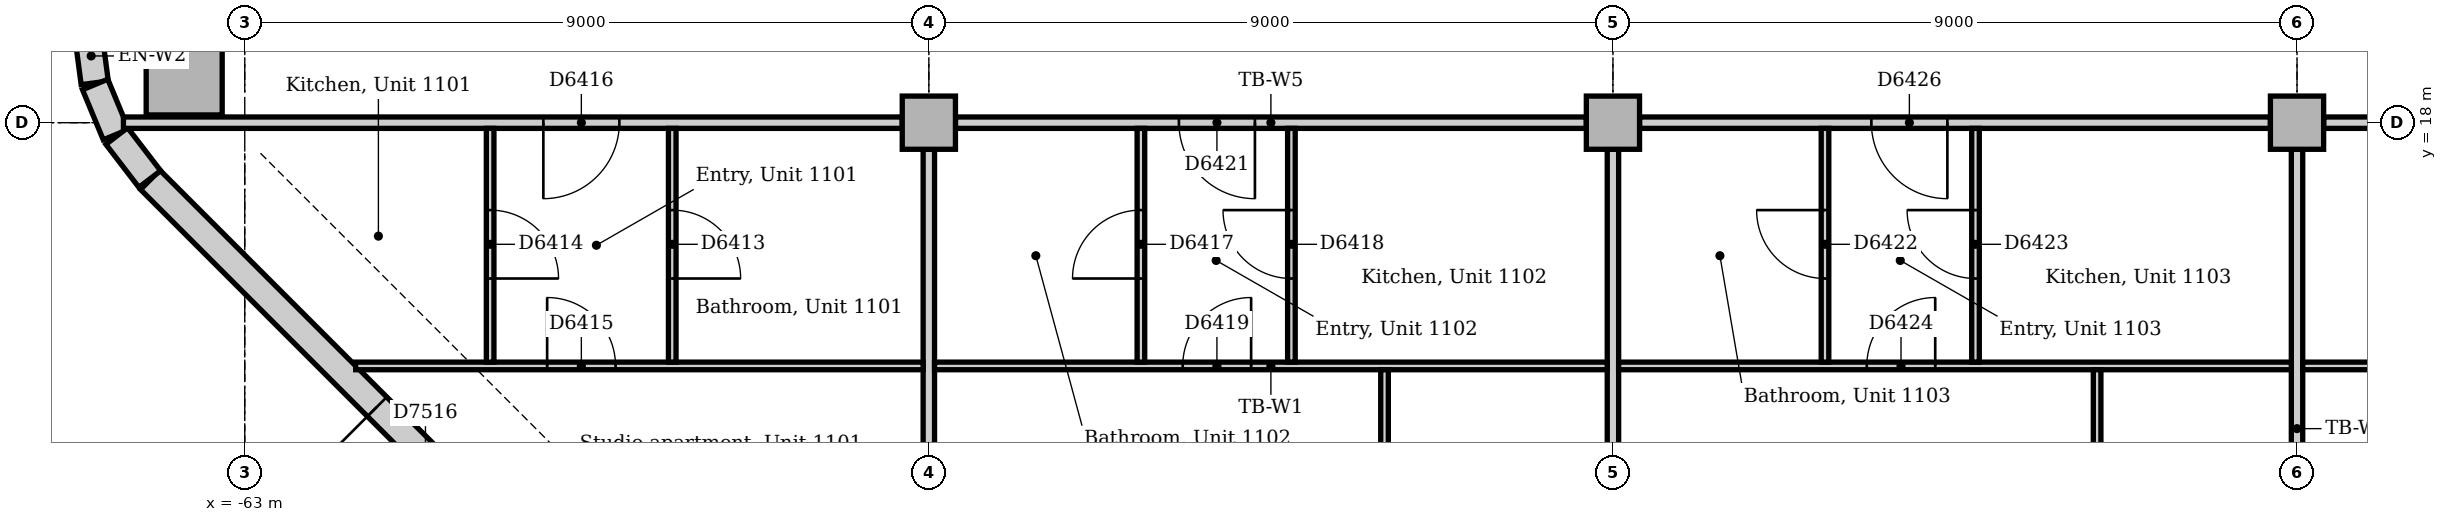
"""IFC4 building model, lengths in metres.
Left out: names, types, materials, properties, quantities, classifications, styles, units other than length and angle.
Written with IfcOpenShell. Run it as: python <this file> out.ifc"""

import sys

from ifc_helpers import new_model, si_unit, direction, frame, frame_2d, origin, origin_2d, place, context, subcontext, project, spatial, rectangle, extrude, element, fill, save


model = new_model("IFC4")
c1 = context("Model", 3, precision=1e-05, world=origin(), true_north=direction((0.0, 1.0)))
c2 = subcontext(c1, "Body", "Model", "MODEL_VIEW")
j1 = project(units=[si_unit("LENGTHUNIT", "METRE"), si_unit("PLANEANGLEUNIT", "RADIAN")], contexts=[c1])
p1 = place(None, origin())
s1 = spatial("IfcSite", under=j1, at=p1, CompositionType="ELEMENT")
p2 = place(p1, origin())
s2 = spatial("IfcBuilding", under=s1, at=p2, CompositionType="ELEMENT")
p3 = place(p2, frame((0.0, 0.0, 51.0)))
s3 = spatial("IfcBuildingStorey", under=s2, at=p3, CompositionType="ELEMENT", Elevation=51.0)
p4 = place(p3, frame((-63.797, 18.602, -0.15), z_axis=(0.0, 0.0, 1.0), x_axis=(1.0, 0.0, 0.0)))
e1 = element("IfcColumn", 1, at=p4, inside=s3, PredefinedType="COLUMN", context=c2, shape_type="SweptSolid", body=[
    extrude(rectangle(XDim=1.0, YDim=1.0, at=origin_2d()), origin(), (0.0, 0.0, 1.0), 4.0),
])
for number, where, z_axis, x_axis in (
    (2, (-54.0, 18.0, 0.0), (0.0, 0.0, 1.0), (1.0, 0.0, 0.0)),
    (3, (-45.0, 18.0, 0.0), (0.0, 0.0, 1.0), (1.0, 0.0, 0.0)),
    (4, (-36.0, 18.0, 0.0), (0.0, 0.0, 1.0), (1.0, 0.0, 0.0)),
):
    element("IfcColumn", number, at=place(p3, frame(where, z_axis=z_axis, x_axis=x_axis)), inside=s3, PredefinedType="COLUMN", context=c2, shape_type="SweptSolid", body=[
        extrude(rectangle(XDim=0.7, YDim=0.7, at=origin_2d()), origin(), (0.0, 0.0, 1.0), 3.85),
    ])
p5 = place(p3, frame((-64.244, 17.249, 0.0), z_axis=(0.0, 0.0, 1.0), x_axis=(0.707106781187, -0.707106781187, 0.0)))
e5 = element("IfcWall", 5, at=p5, inside=s3, PredefinedType="STANDARD", context=c2, shape_type="SweptSolid", body=[
    extrude(rectangle(XDim=10.243, YDim=0.36, at=frame_2d((5.121, 0.0))), origin(), (0.0, 0.0, 1.0), 3.85),
])
p6 = place(p5, frame((4.221, 0.0, 0.0)))
e6 = element("IfcOpeningElement", 6, at=p6, cuts=e5, PredefinedType="OPENING", context=c2, shape_type="SweptSolid", body=[
    extrude(rectangle(XDim=1.8, YDim=2.4, at=frame_2d((0.9, 1.2))), frame((0.0, 0.19, 0.0), z_axis=(0.0, -1.0, 0.0), x_axis=(1.0, 0.0, 0.0)), (0.0, 0.0, 1.0), 0.38),
])
for number, where, z_axis, x_axis in (
    (7, (-65.067, 19.231, 0.0), (0.0, 0.0, 1.0), (0.131, -0.991, 0.0)),
    (8, (-64.968, 18.503, 0.0), (0.0, 0.0, 1.0), (0.383, -0.924, 0.0)),
):
    element("IfcWall", number, at=place(p3, frame(where, z_axis=z_axis, x_axis=x_axis)), inside=s3, PredefinedType="STANDARD", context=c2, shape_type="SweptSolid", body=[
        extrude(rectangle(XDim=0.713, YDim=0.36, at=frame_2d((0.356, 0.0))), origin(), (0.0, 0.0, 1.0), 3.85),
    ])
p7 = place(p3, frame((-64.684, 17.825, 0.0), z_axis=(0.0, 0.0, 1.0), x_axis=(0.608802368033, -0.793321924995, 0.0)))
e9 = element("IfcWall", 9, at=p7, inside=s3, PredefinedType="STANDARD", context=c2, shape_type="SweptSolid", body=[
    extrude(rectangle(XDim=0.713, YDim=0.36, at=frame_2d((0.357, 0.0))), origin(), (0.0, 0.0, 1.0), 3.85),
])
p8 = place(p3, frame((-35.65, 18.0, 0.0), z_axis=(0.0, 0.0, 1.0), x_axis=(1.0, 0.0, 0.0)))
e10 = element("IfcWall", 10, at=p8, inside=s3, PredefinedType="PARTITIONING", context=c2, shape_type="SweptSolid", body=[
    extrude(rectangle(XDim=7.35, YDim=0.15, at=frame_2d((3.675, 0.0))), origin(), (0.0, 0.0, 1.0), 3.158),
])
p9 = place(p8, frame((2.778, 0.0, 0.0)))
e11 = element("IfcOpeningElement", 11, at=p9, cuts=e10, PredefinedType="OPENING", context=c2, shape_type="SweptSolid", body=[
    extrude(rectangle(XDim=1.0, YDim=2.1, at=frame_2d((0.5, 1.05))), frame((0.0, 0.085, 0.0), z_axis=(0.0, -1.0, 0.0), x_axis=(1.0, 0.0, 0.0)), (0.0, 0.0, 1.0), 0.17),
])
p10 = place(p3, frame((-44.65, 18.0, 0.0), z_axis=(0.0, 0.0, 1.0), x_axis=(1.0, 0.0, 0.0)))
e12 = element("IfcWall", 12, at=p10, inside=s3, PredefinedType="PARTITIONING", context=c2, shape_type="SweptSolid", body=[
    extrude(rectangle(XDim=8.3, YDim=0.15, at=frame_2d((4.15, 0.0))), origin(), (0.0, 0.0, 1.0), 3.158),
])
p11 = place(p10, frame((3.05, 0.0, 0.0)))
e13 = element("IfcOpeningElement", 13, at=p11, cuts=e12, PredefinedType="OPENING", context=c2, shape_type="SweptSolid", body=[
    extrude(rectangle(XDim=1.0, YDim=2.1, at=frame_2d((0.5, 1.05))), frame((0.0, 0.085, 0.0), z_axis=(0.0, -1.0, 0.0), x_axis=(1.0, 0.0, 0.0)), (0.0, 0.0, 1.0), 0.17),
])
p12 = place(p3, frame((-53.65, 18.0, 0.0), z_axis=(0.0, 0.0, 1.0), x_axis=(1.0, 0.0, 0.0)))
e14 = element("IfcWall", 14, at=p12, inside=s3, PredefinedType="PARTITIONING", context=c2, shape_type="SweptSolid", body=[
    extrude(rectangle(XDim=8.3, YDim=0.15, at=frame_2d((4.15, 0.0))), origin(), (0.0, 0.0, 1.0), 3.158),
])
p13 = place(p12, frame((2.94, 0.0, 0.0)))
e15 = element("IfcOpeningElement", 15, at=p13, cuts=e14, PredefinedType="OPENING", context=c2, shape_type="SweptSolid", body=[
    extrude(rectangle(XDim=1.0, YDim=2.1, at=frame_2d((0.5, 1.05))), frame((0.0, 0.085, 0.0), z_axis=(0.0, -1.0, 0.0), x_axis=(1.0, 0.0, 0.0)), (0.0, 0.0, 1.0), 0.17),
])
p14 = place(p3, frame((-64.596, 18.0, 0.0), z_axis=(0.0, 0.0, 1.0), x_axis=(1.0, 0.0, 0.0)))
e16 = element("IfcWall", 16, at=p14, inside=s3, PredefinedType="PARTITIONING", context=c2, shape_type="SweptSolid", body=[
    extrude(rectangle(XDim=10.246, YDim=0.15, at=frame_2d((5.123, 0.0))), origin(), (0.0, 0.0, 1.0), 3.158),
])
p15 = place(p14, frame((5.524, 0.0, 0.0)))
e17 = element("IfcOpeningElement", 17, at=p15, cuts=e16, PredefinedType="OPENING", context=c2, shape_type="SweptSolid", body=[
    extrude(rectangle(XDim=1.0, YDim=2.1, at=frame_2d((0.5, 1.05))), frame((0.0, 0.085, 0.0), z_axis=(0.0, -1.0, 0.0), x_axis=(1.0, 0.0, 0.0)), (0.0, 0.0, 1.0), 0.17),
])
p16 = place(p3, frame((-54.0, 9.36, 0.0), z_axis=(0.0, 0.0, 1.0), x_axis=(0.0, 1.0, 0.0)))
e18 = element("IfcWall", 18, at=p16, inside=s3, PredefinedType="PARTITIONING", context=c2, shape_type="SweptSolid", body=[
    extrude(rectangle(XDim=8.29, YDim=0.15, at=frame_2d((4.145, 0.0))), origin(), (0.0, 0.0, 1.0), 3.256),
])
for number, where, z_axis, x_axis in (
    (19, (-45.0, 10.3, 0.0), (0.0, 0.0, 1.0), (0.0, 1.0, 0.0)),
    (20, (-36.0, 10.3, 0.0), (0.0, 0.0, 1.0), (0.0, 1.0, 0.0)),
):
    element("IfcWall", number, at=place(p3, frame(where, z_axis=z_axis, x_axis=x_axis)), inside=s3, PredefinedType="PARTITIONING", context=c2, shape_type="SweptSolid", body=[
        extrude(rectangle(XDim=7.35, YDim=0.15, at=frame_2d((3.675, 0.0))), origin(), (0.0, 0.0, 1.0), 3.256),
    ])
p17 = place(p3, frame((-35.925, 14.8, 0.0), z_axis=(0.0, 0.0, 1.0), x_axis=(1.0, 0.0, 0.0)))
e21 = element("IfcWall", 21, at=p17, inside=s3, PredefinedType="PARTITIONING", context=c2, shape_type="SweptSolid", body=[
    extrude(rectangle(XDim=8.565, YDim=0.1, at=frame_2d((4.282, 0.0))), origin(), (0.0, 0.0, 1.0), 3.85),
])
p18 = place(p17, frame((3.103, 0.0, 0.0)))
e22 = element("IfcOpeningElement", 22, at=p18, cuts=e21, PredefinedType="OPENING", context=c2, shape_type="SweptSolid", body=[
    extrude(rectangle(XDim=0.9, YDim=2.1, at=frame_2d((0.45, 1.05))), frame((0.0, 0.06, 0.0), z_axis=(0.0, -1.0, 0.0), x_axis=(1.0, 0.0, 0.0)), (0.0, 0.0, 1.0), 0.12),
])
p19 = place(p3, frame((-44.925, 14.8, 0.0), z_axis=(0.0, 0.0, 1.0), x_axis=(1.0, 0.0, 0.0)))
e23 = element("IfcWall", 23, at=p19, inside=s3, PredefinedType="PARTITIONING", context=c2, shape_type="SweptSolid", body=[
    extrude(rectangle(XDim=8.85, YDim=0.1, at=frame_2d((4.425, 0.0))), origin(), (0.0, 0.0, 1.0), 3.85),
])
p20 = place(p19, frame((3.265, 0.0, 0.0)))
e24 = element("IfcOpeningElement", 24, at=p20, cuts=e23, PredefinedType="OPENING", context=c2, shape_type="SweptSolid", body=[
    extrude(rectangle(XDim=0.9, YDim=2.1, at=frame_2d((0.45, 1.05))), frame((0.0, 0.06, 0.0), z_axis=(0.0, -1.0, 0.0), x_axis=(1.0, 0.0, 0.0)), (0.0, 0.0, 1.0), 0.12),
])
p21 = place(p3, frame((-53.925, 14.8, 0.0), z_axis=(0.0, 0.0, 1.0), x_axis=(1.0, 0.0, 0.0)))
e25 = element("IfcWall", 25, at=p21, inside=s3, PredefinedType="PARTITIONING", context=c2, shape_type="SweptSolid", body=[
    extrude(rectangle(XDim=8.85, YDim=0.1, at=frame_2d((4.425, 0.0))), origin(), (0.0, 0.0, 1.0), 3.85),
])
p22 = place(p21, frame((3.265, 0.0, 0.0)))
e26 = element("IfcOpeningElement", 26, at=p22, cuts=e25, PredefinedType="OPENING", context=c2, shape_type="SweptSolid", body=[
    extrude(rectangle(XDim=0.9, YDim=2.1, at=frame_2d((0.45, 1.05))), frame((0.0, 0.06, 0.0), z_axis=(0.0, -1.0, 0.0), x_axis=(1.0, 0.0, 0.0)), (0.0, 0.0, 1.0), 0.12),
])
p23 = place(p3, frame((-61.541, 14.8, 0.0), z_axis=(0.0, 0.0, 1.0), x_axis=(1.0, 0.0, 0.0)))
e27 = element("IfcWall", 27, at=p23, inside=s3, PredefinedType="PARTITIONING", context=c2, shape_type="SweptSolid", body=[
    extrude(rectangle(XDim=7.466, YDim=0.1, at=frame_2d((3.733, 0.0))), origin(), (0.0, 0.0, 1.0), 3.85),
])
p24 = place(p23, frame((2.519, 0.0, 0.0)))
e28 = element("IfcOpeningElement", 28, at=p24, cuts=e27, PredefinedType="OPENING", context=c2, shape_type="SweptSolid", body=[
    extrude(rectangle(XDim=0.9, YDim=2.1, at=frame_2d((0.45, 1.05))), frame((0.0, 0.06, 0.0), z_axis=(0.0, -1.0, 0.0), x_axis=(1.0, 0.0, 0.0)), (0.0, 0.0, 1.0), 0.12),
])
p25 = place(p3, frame((-48.005, 9.36, 0.0), z_axis=(0.0, 0.0, 1.0), x_axis=(0.0, 1.0, 0.0)))
e29 = element("IfcWall", 29, at=p25, inside=s3, PredefinedType="PARTITIONING", context=c2, shape_type="SweptSolid", body=[
    extrude(rectangle(XDim=5.39, YDim=0.1, at=frame_2d((2.695, 0.0))), origin(), (0.0, 0.0, 1.0), 3.85),
])
p26 = place(p25, frame((2.25, 0.0, 0.0)))
e30 = element("IfcOpeningElement", 30, at=p26, cuts=e29, PredefinedType="OPENING", context=c2, shape_type="SweptSolid", body=[
    extrude(rectangle(XDim=0.9, YDim=2.1, at=frame_2d((0.45, 1.05))), frame((0.0, 0.06, 0.0), z_axis=(0.0, -1.0, 0.0), x_axis=(1.0, 0.0, 0.0)), (0.0, 0.0, 1.0), 0.12),
])
p27 = place(p3, frame((-38.63, 9.36, 0.0), z_axis=(0.0, 0.0, 1.0), x_axis=(0.0, 1.0, 0.0)))
e31 = element("IfcWall", 31, at=p27, inside=s3, PredefinedType="PARTITIONING", context=c2, shape_type="SweptSolid", body=[
    extrude(rectangle(XDim=5.39, YDim=0.1, at=frame_2d((2.695, 0.0))), origin(), (0.0, 0.0, 1.0), 3.85),
])
p28 = place(p27, frame((2.25, 0.0, 0.0)))
e32 = element("IfcOpeningElement", 32, at=p28, cuts=e31, PredefinedType="OPENING", context=c2, shape_type="SweptSolid", body=[
    extrude(rectangle(XDim=0.9, YDim=2.1, at=frame_2d((0.45, 1.05))), frame((0.0, 0.06, 0.0), z_axis=(0.0, -1.0, 0.0), x_axis=(1.0, 0.0, 0.0)), (0.0, 0.0, 1.0), 0.12),
])
p29 = place(p3, frame((-59.772, 14.85, 0.0), z_axis=(0.0, 0.0, 1.0), x_axis=(0.0, 1.0, 0.0)))
e33 = element("IfcWall", 33, at=p29, inside=s3, PredefinedType="PARTITIONING", context=c2, shape_type="SweptSolid", body=[
    extrude(rectangle(XDim=3.075, YDim=0.1, at=frame_2d((1.538, 0.0))), origin(), (0.0, 0.0, 1.0), 3.85),
])
p30 = place(p29, frame((1.1, 0.0, 0.0)))
e34 = element("IfcOpeningElement", 34, at=p30, cuts=e33, PredefinedType="OPENING", context=c2, shape_type="SweptSolid", body=[
    extrude(rectangle(XDim=0.9, YDim=2.1, at=frame_2d((0.45, 1.05))), frame((0.0, 0.06, 0.0), z_axis=(0.0, -1.0, 0.0), x_axis=(1.0, 0.0, 0.0)), (0.0, 0.0, 1.0), 0.12),
])
p31 = place(p3, frame((-57.376, 14.85, 0.0), z_axis=(0.0, 0.0, 1.0), x_axis=(0.0, 1.0, 0.0)))
e35 = element("IfcWall", 35, at=p31, inside=s3, PredefinedType="PARTITIONING", context=c2, shape_type="SweptSolid", body=[
    extrude(rectangle(XDim=3.075, YDim=0.1, at=frame_2d((1.538, 0.0))), origin(), (0.0, 0.0, 1.0), 3.85),
])
p32 = place(p31, frame((1.1, 0.0, 0.0)))
e36 = element("IfcOpeningElement", 36, at=p32, cuts=e35, PredefinedType="OPENING", context=c2, shape_type="SweptSolid", body=[
    extrude(rectangle(XDim=0.9, YDim=2.1, at=frame_2d((0.45, 1.05))), frame((0.0, 0.06, 0.0), z_axis=(0.0, -1.0, 0.0), x_axis=(1.0, 0.0, 0.0)), (0.0, 0.0, 1.0), 0.12),
])
p33 = place(p3, frame((-51.21, 14.85, 0.0), z_axis=(0.0, 0.0, 1.0), x_axis=(0.0, 1.0, 0.0)))
e37 = element("IfcWall", 37, at=p33, inside=s3, PredefinedType="PARTITIONING", context=c2, shape_type="SweptSolid", body=[
    extrude(rectangle(XDim=3.075, YDim=0.1, at=frame_2d((1.538, 0.0))), origin(), (0.0, 0.0, 1.0), 3.85),
])
p34 = place(p33, frame((1.1, 0.0, 0.0)))
e38 = element("IfcOpeningElement", 38, at=p34, cuts=e37, PredefinedType="OPENING", context=c2, shape_type="SweptSolid", body=[
    extrude(rectangle(XDim=0.9, YDim=2.1, at=frame_2d((0.45, 1.05))), frame((0.0, 0.06, 0.0), z_axis=(0.0, -1.0, 0.0), x_axis=(1.0, 0.0, 0.0)), (0.0, 0.0, 1.0), 0.12),
])
p35 = place(p3, frame((-49.23, 14.85, 0.0), z_axis=(0.0, 0.0, 1.0), x_axis=(0.0, 1.0, 0.0)))
e39 = element("IfcWall", 39, at=p35, inside=s3, PredefinedType="PARTITIONING", context=c2, shape_type="SweptSolid", body=[
    extrude(rectangle(XDim=3.075, YDim=0.1, at=frame_2d((1.538, 0.0))), origin(), (0.0, 0.0, 1.0), 3.85),
])
p36 = place(p35, frame((1.1, 0.0, 0.0)))
e40 = element("IfcOpeningElement", 40, at=p36, cuts=e39, PredefinedType="OPENING", context=c2, shape_type="SweptSolid", body=[
    extrude(rectangle(XDim=0.9, YDim=2.1, at=frame_2d((0.45, 1.05))), frame((0.0, 0.06, 0.0), z_axis=(0.0, -1.0, 0.0), x_axis=(1.0, 0.0, 0.0)), (0.0, 0.0, 1.0), 0.12),
])
p37 = place(p3, frame((-42.21, 14.85, 0.0), z_axis=(0.0, 0.0, 1.0), x_axis=(0.0, 1.0, 0.0)))
e41 = element("IfcWall", 41, at=p37, inside=s3, PredefinedType="PARTITIONING", context=c2, shape_type="SweptSolid", body=[
    extrude(rectangle(XDim=3.075, YDim=0.1, at=frame_2d((1.538, 0.0))), origin(), (0.0, 0.0, 1.0), 3.85),
])
p38 = place(p37, frame((1.1, 0.0, 0.0)))
e42 = element("IfcOpeningElement", 42, at=p38, cuts=e41, PredefinedType="OPENING", context=c2, shape_type="SweptSolid", body=[
    extrude(rectangle(XDim=0.9, YDim=2.1, at=frame_2d((0.45, 1.05))), frame((0.0, 0.06, 0.0), z_axis=(0.0, -1.0, 0.0), x_axis=(1.0, 0.0, 0.0)), (0.0, 0.0, 1.0), 0.12),
])
p39 = place(p3, frame((-40.23, 14.85, 0.0), z_axis=(0.0, 0.0, 1.0), x_axis=(0.0, 1.0, 0.0)))
e43 = element("IfcWall", 43, at=p39, inside=s3, PredefinedType="PARTITIONING", context=c2, shape_type="SweptSolid", body=[
    extrude(rectangle(XDim=3.075, YDim=0.1, at=frame_2d((1.538, 0.0))), origin(), (0.0, 0.0, 1.0), 3.85),
])
p40 = place(p39, frame((1.1, 0.0, 0.0)))
e44 = element("IfcOpeningElement", 44, at=p40, cuts=e43, PredefinedType="OPENING", context=c2, shape_type="SweptSolid", body=[
    extrude(rectangle(XDim=0.9, YDim=2.1, at=frame_2d((0.45, 1.05))), frame((0.0, 0.06, 0.0), z_axis=(0.0, -1.0, 0.0), x_axis=(1.0, 0.0, 0.0)), (0.0, 0.0, 1.0), 0.12),
])
p41 = place(p6, frame((1.8, 0.0, 0.0), z_axis=(0.0, 0.0, 1.0), x_axis=(-1.0, 0.0, 0.0)))
e45 = element("IfcDoor", 45, at=p41, inside=s3, OperationType="DOUBLE_DOOR_SINGLE_SWING", PredefinedType="DOOR", context=c2, shape_type="SweptSolid", body=[
    extrude(rectangle(XDim=1.8, YDim=2.4, at=frame_2d((0.9, 1.2))), frame((0.0, -0.07, 0.0), z_axis=(0.0, -1.0, 0.0), x_axis=(1.0, 0.0, 0.0)), (0.0, 0.0, 1.0), 0.05),
])
fill(e6, e45)
p42 = place(p32, frame((0.9, 0.0, 0.0), z_axis=(0.0, 0.0, 1.0), x_axis=(-1.0, 0.0, 0.0)))
e46 = element("IfcDoor", 46, at=p42, inside=s3, OperationType="SINGLE_SWING_RIGHT", PredefinedType="DOOR", context=c2, shape_type="SweptSolid", body=[
    extrude(rectangle(XDim=0.9, YDim=2.1, at=frame_2d((0.45, 1.05))), frame((0.0, 0.025, 0.0), z_axis=(0.0, -1.0, 0.0), x_axis=(1.0, 0.0, 0.0)), (0.0, 0.0, 1.0), 0.05),
])
fill(e36, e46)
p43 = place(p30, frame((0.9, 0.0, 0.0), z_axis=(0.0, 0.0, 1.0), x_axis=(-1.0, 0.0, 0.0)))
e47 = element("IfcDoor", 47, at=p43, inside=s3, OperationType="SINGLE_SWING_RIGHT", PredefinedType="DOOR", context=c2, shape_type="SweptSolid", body=[
    extrude(rectangle(XDim=0.9, YDim=2.1, at=frame_2d((0.45, 1.05))), frame((0.0, 0.025, 0.0), z_axis=(0.0, -1.0, 0.0), x_axis=(1.0, 0.0, 0.0)), (0.0, 0.0, 1.0), 0.05),
])
fill(e34, e47)
p44 = place(p24, origin())
e48 = element("IfcDoor", 48, at=p44, inside=s3, OperationType="SINGLE_SWING_LEFT", PredefinedType="DOOR", context=c2, shape_type="SweptSolid", body=[
    extrude(rectangle(XDim=0.9, YDim=2.1, at=frame_2d((0.45, 1.05))), frame((0.0, 0.025, 0.0), z_axis=(0.0, -1.0, 0.0), x_axis=(1.0, 0.0, 0.0)), (0.0, 0.0, 1.0), 0.05),
])
fill(e28, e48)
p45 = place(p15, frame((1.0, 0.0, 0.0), z_axis=(0.0, 0.0, 1.0), x_axis=(-1.0, 0.0, 0.0)))
e49 = element("IfcDoor", 49, at=p45, inside=s3, OperationType="SINGLE_SWING_RIGHT", PredefinedType="DOOR", context=c2, shape_type="SweptSolid", body=[
    extrude(rectangle(XDim=1.0, YDim=2.1, at=frame_2d((0.5, 1.05))), frame((0.0, 0.025, 0.0), z_axis=(0.0, -1.0, 0.0), x_axis=(1.0, 0.0, 0.0)), (0.0, 0.0, 1.0), 0.05),
])
fill(e17, e49)
p46 = place(p34, origin())
e50 = element("IfcDoor", 50, at=p46, inside=s3, OperationType="SINGLE_SWING_LEFT", PredefinedType="DOOR", context=c2, shape_type="SweptSolid", body=[
    extrude(rectangle(XDim=0.9, YDim=2.1, at=frame_2d((0.45, 1.05))), frame((0.0, 0.025, 0.0), z_axis=(0.0, -1.0, 0.0), x_axis=(1.0, 0.0, 0.0)), (0.0, 0.0, 1.0), 0.05),
])
fill(e38, e50)
p47 = place(p36, origin())
e51 = element("IfcDoor", 51, at=p47, inside=s3, OperationType="SINGLE_SWING_RIGHT", PredefinedType="DOOR", context=c2, shape_type="SweptSolid", body=[
    extrude(rectangle(XDim=0.9, YDim=2.1, at=frame_2d((0.45, 1.05))), frame((0.0, 0.025, 0.0), z_axis=(0.0, -1.0, 0.0), x_axis=(1.0, 0.0, 0.0)), (0.0, 0.0, 1.0), 0.05),
])
fill(e40, e51)
p48 = place(p22, origin())
e52 = element("IfcDoor", 52, at=p48, inside=s3, OperationType="SINGLE_SWING_RIGHT", PredefinedType="DOOR", context=c2, shape_type="SweptSolid", body=[
    extrude(rectangle(XDim=0.9, YDim=2.1, at=frame_2d((0.45, 1.05))), frame((0.0, 0.025, 0.0), z_axis=(0.0, -1.0, 0.0), x_axis=(1.0, 0.0, 0.0)), (0.0, 0.0, 1.0), 0.05),
])
fill(e26, e52)
p49 = place(p13, frame((1.0, 0.0, 0.0), z_axis=(0.0, 0.0, 1.0), x_axis=(-1.0, 0.0, 0.0)))
e53 = element("IfcDoor", 53, at=p49, inside=s3, OperationType="SINGLE_SWING_LEFT", PredefinedType="DOOR", context=c2, shape_type="SweptSolid", body=[
    extrude(rectangle(XDim=1.0, YDim=2.1, at=frame_2d((0.5, 1.05))), frame((0.0, 0.025, 0.0), z_axis=(0.0, -1.0, 0.0), x_axis=(1.0, 0.0, 0.0)), (0.0, 0.0, 1.0), 0.05),
])
fill(e15, e53)
p50 = place(p38, origin())
e54 = element("IfcDoor", 54, at=p50, inside=s3, OperationType="SINGLE_SWING_RIGHT", PredefinedType="DOOR", context=c2, shape_type="SweptSolid", body=[
    extrude(rectangle(XDim=0.9, YDim=2.1, at=frame_2d((0.45, 1.05))), frame((0.0, 0.025, 0.0), z_axis=(0.0, -1.0, 0.0), x_axis=(1.0, 0.0, 0.0)), (0.0, 0.0, 1.0), 0.05),
])
fill(e42, e54)
p51 = place(p40, origin())
e55 = element("IfcDoor", 55, at=p51, inside=s3, OperationType="SINGLE_SWING_RIGHT", PredefinedType="DOOR", context=c2, shape_type="SweptSolid", body=[
    extrude(rectangle(XDim=0.9, YDim=2.1, at=frame_2d((0.45, 1.05))), frame((0.0, 0.025, 0.0), z_axis=(0.0, -1.0, 0.0), x_axis=(1.0, 0.0, 0.0)), (0.0, 0.0, 1.0), 0.05),
])
fill(e44, e55)
p52 = place(p20, origin())
e56 = element("IfcDoor", 56, at=p52, inside=s3, OperationType="SINGLE_SWING_RIGHT", PredefinedType="DOOR", context=c2, shape_type="SweptSolid", body=[
    extrude(rectangle(XDim=0.9, YDim=2.1, at=frame_2d((0.45, 1.05))), frame((0.0, 0.025, 0.0), z_axis=(0.0, -1.0, 0.0), x_axis=(1.0, 0.0, 0.0)), (0.0, 0.0, 1.0), 0.05),
])
fill(e24, e56)
p53 = place(p11, frame((1.0, 0.0, 0.0), z_axis=(0.0, 0.0, 1.0), x_axis=(-1.0, 0.0, 0.0)))
e57 = element("IfcDoor", 57, at=p53, inside=s3, OperationType="SINGLE_SWING_LEFT", PredefinedType="DOOR", context=c2, shape_type="SweptSolid", body=[
    extrude(rectangle(XDim=1.0, YDim=2.1, at=frame_2d((0.5, 1.05))), frame((0.0, 0.025, 0.0), z_axis=(0.0, -1.0, 0.0), x_axis=(1.0, 0.0, 0.0)), (0.0, 0.0, 1.0), 0.05),
])
fill(e13, e57)
save(model, sys.argv[1])
